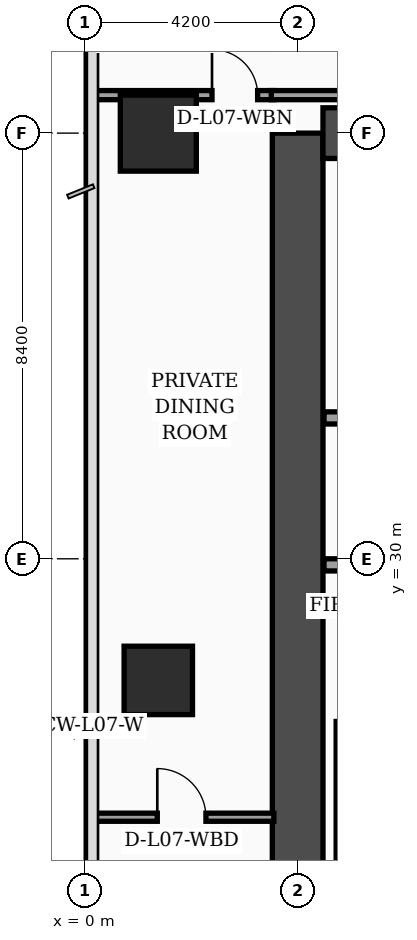
"""IFC4 building model, lengths in metres.
Left out: names, types, materials, properties, quantities, classifications, styles, units other than length and angle.
Written with IfcOpenShell. Run it as: python <this file> out.ifc"""

import sys

from ifc_helpers import new_model, si_unit, direction, frame, frame_2d, origin, origin_2d, place, context, subcontext, project, spatial, rectangle, extrude, element, fill, save


model = new_model("IFC4")
c1 = context("Model", 3, precision=1e-05, world=origin(), true_north=direction((0.0, 1.0)))
c2 = subcontext(c1, "Body", "Model", "MODEL_VIEW")
j1 = project(units=[si_unit("LENGTHUNIT", "METRE"), si_unit("PLANEANGLEUNIT", "RADIAN")], contexts=[c1])
p1 = place(None, origin())
s1 = spatial("IfcSite", under=j1, at=p1, CompositionType="ELEMENT")
p2 = place(p1, origin())
s2 = spatial("IfcBuilding", under=s1, at=p2, CompositionType="ELEMENT")
p3 = place(p2, frame((0.0, 0.0, 34.6)))
s3 = spatial("IfcBuildingStorey", under=s2, at=p3, CompositionType="ELEMENT", Elevation=34.6)
p4 = place(p3, frame((4.2, 16.8, 0.0), z_axis=(0.0, 0.0, 1.0), x_axis=(0.0, 1.0, 0.0)))
e1 = element("IfcWall", 1, at=p4, inside=s3, PredefinedType="SHEAR", context=c2, shape_type="SweptSolid", body=[
    extrude(rectangle(XDim=21.6, YDim=1.0, at=frame_2d((10.8, 0.0))), origin(), (0.0, 0.0, 1.0), 3.56),
])
p5 = place(p3, frame((4.7, 38.4, 0.0), z_axis=(0.0, 0.0, 1.0), x_axis=(1.0, 0.0, 0.0)))
e2 = element("IfcWall", 2, at=p5, inside=s3, PredefinedType="SHEAR", context=c2, shape_type="SweptSolid", body=[
    extrude(rectangle(XDim=9.8, YDim=1.0, at=frame_2d((4.9, 0.0))), origin(), (0.0, 0.0, 1.0), 3.56),
])
p6 = place(p3, frame((5.08, 17.3, 0.0), z_axis=(0.0, 0.0, 1.0), x_axis=(0.0, 1.0, 0.0)))
e3 = element("IfcWall", 3, at=p6, inside=s3, PredefinedType="SOLIDWALL", context=c2, shape_type="SweptSolid", body=[
    extrude(rectangle(XDim=9.49, YDim=0.24, at=frame_2d((4.745, 0.0))), origin(), (0.0, 0.0, 1.0), 3.56),
])
p7 = place(p3, frame((1.45, 27.6, 0.0), z_axis=(0.0, 0.0, 1.0), x_axis=(1.0, 0.0, 0.0)))
e4 = element("IfcColumn", 4, at=p7, inside=s3, PredefinedType="COLUMN", context=c2, shape_type="SweptSolid", body=[
    extrude(rectangle(XDim=1.35, YDim=1.35, at=origin_2d()), origin(), (0.0, 0.0, 1.0), 3.56),
])
p8 = place(p3, frame((1.45, 38.4, 0.0), z_axis=(0.0, 0.0, 1.0), x_axis=(1.0, 0.0, 0.0)))
e5 = element("IfcColumn", 5, at=p8, inside=s3, PredefinedType="COLUMN", context=c2, shape_type="SweptSolid", body=[
    extrude(rectangle(XDim=1.5, YDim=1.5, at=origin_2d()), origin(), (0.0, 0.0, 1.0), 3.56),
])
p9 = place(p3, frame((4.72, 29.88, 0.0), z_axis=(0.0, 0.0, 1.0), x_axis=(1.0, 0.0, 0.0)))
e6 = element("IfcWall", 6, at=p9, inside=s3, PredefinedType="SOLIDWALL", context=c2, shape_type="SweptSolid", body=[
    extrude(rectangle(XDim=4.7, YDim=0.24, at=frame_2d((2.35, 0.0))), origin(), (0.0, 0.0, 1.0), 3.56),
])
p10 = place(p9, frame((0.45, 0.0, 0.0)))
e7 = element("IfcOpeningElement", 7, at=p10, cuts=e6, PredefinedType="OPENING", context=c2, shape_type="SweptSolid", body=[
    extrude(rectangle(XDim=1.3, YDim=2.35, at=frame_2d((0.65, 1.175))), frame((0.0, 0.13, 0.0), z_axis=(0.0, -1.0, 0.0), x_axis=(1.0, 0.0, 0.0)), (0.0, 0.0, 1.0), 0.26),
])
p11 = place(p3, frame((4.72, 32.78, 0.0), z_axis=(0.0, 0.0, 1.0), x_axis=(1.0, 0.0, 0.0)))
e8 = element("IfcWall", 8, at=p11, inside=s3, PredefinedType="SOLIDWALL", context=c2, shape_type="SweptSolid", body=[
    extrude(rectangle(XDim=4.7, YDim=0.24, at=frame_2d((2.35, 0.0))), origin(), (0.0, 0.0, 1.0), 3.56),
])
p12 = place(p3, frame((0.08, 24.9, 0.0), z_axis=(0.0, 0.0, 1.0), x_axis=(1.0, 0.0, 0.0)))
e9 = element("IfcWall", 9, at=p12, inside=s3, PredefinedType="PARTITIONING", context=c2, shape_type="SweptSolid", body=[
    extrude(rectangle(XDim=3.65, YDim=0.16, at=frame_2d((1.825, 0.0))), origin(), (0.0, 0.0, 1.0), 3.04),
])
p13 = place(p12, frame((1.35, 0.0, 0.0)))
e10 = element("IfcOpeningElement", 10, at=p13, cuts=e9, PredefinedType="OPENING", context=c2, shape_type="SweptSolid", body=[
    extrude(rectangle(XDim=0.96, YDim=2.2, at=frame_2d((0.48, 1.1))), frame((0.0, 0.09, 0.0), z_axis=(0.0, -1.0, 0.0), x_axis=(1.0, 0.0, 0.0)), (0.0, 0.0, 1.0), 0.18),
])
p14 = place(p3, frame((0.08, 39.15, 0.0), z_axis=(0.0, 0.0, 1.0), x_axis=(1.0, 0.0, 0.0)))
e11 = element("IfcWall", 11, at=p14, inside=s3, PredefinedType="PARTITIONING", context=c2, shape_type="SweptSolid", body=[
    extrude(rectangle(XDim=3.65, YDim=0.18, at=frame_2d((1.825, 0.0))), origin(), (0.0, 0.0, 1.0), 2.84),
])
p15 = place(p14, frame((2.43, 0.0, 0.0)))
e12 = element("IfcOpeningElement", 12, at=p15, cuts=e11, PredefinedType="OPENING", context=c2, shape_type="SweptSolid", body=[
    extrude(rectangle(XDim=0.9, YDim=2.15, at=frame_2d((0.45, 1.075))), frame((0.0, 0.1, 0.0), z_axis=(0.0, -1.0, 0.0), x_axis=(1.0, 0.0, 0.0)), (0.0, 0.0, 1.0), 0.2),
])
p16 = place(p3, frame((3.68, 39.15, 0.0), z_axis=(0.0, 0.0, 1.0), x_axis=(1.0, 0.0, 0.0)))
e13 = element("IfcWall", 13, at=p16, inside=s3, PredefinedType="PARTITIONING", context=c2, shape_type="SweptSolid", body=[
    extrude(rectangle(XDim=11.47, YDim=0.18, at=frame_2d((5.735, 0.0))), origin(), (0.0, 0.0, 1.0), 2.84),
])
p17 = place(p13, origin())
e14 = element("IfcDoor", 14, at=p17, inside=s3, OperationType="SINGLE_SWING_LEFT", PredefinedType="DOOR", context=c2, shape_type="SweptSolid", body=[
    extrude(rectangle(XDim=0.96, YDim=2.2, at=frame_2d((0.48, 1.1))), frame((0.0, 0.025, 0.0), z_axis=(0.0, -1.0, 0.0), x_axis=(1.0, 0.0, 0.0)), (0.0, 0.0, 1.0), 0.05),
])
fill(e10, e14)
p18 = place(p15, origin())
e15 = element("IfcDoor", 15, at=p18, inside=s3, OperationType="SINGLE_SWING_LEFT", PredefinedType="DOOR", context=c2, shape_type="SweptSolid", body=[
    extrude(rectangle(XDim=0.9, YDim=2.15, at=frame_2d((0.45, 1.075))), frame((0.0, 0.025, 0.0), z_axis=(0.0, -1.0, 0.0), x_axis=(1.0, 0.0, 0.0)), (0.0, 0.0, 1.0), 0.05),
])
fill(e12, e15)
save(model, sys.argv[1])
